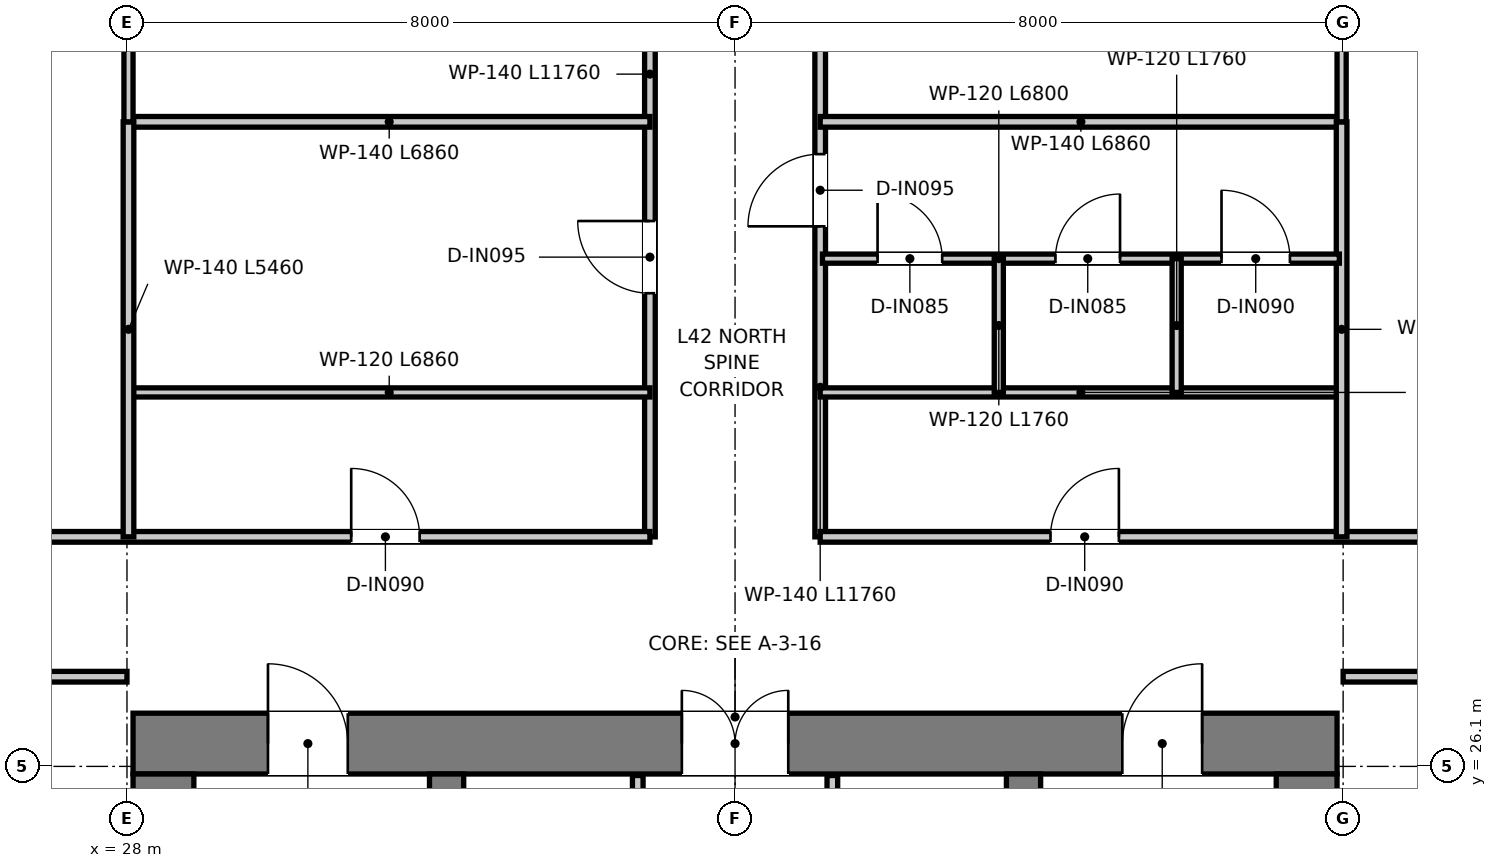
"""IFC4 building model, lengths in metres.
Left out: names, types, materials, properties, quantities, classifications, styles, units other than length and angle.
Written with IfcOpenShell. Run it as: python <this file> out.ifc"""

import sys

from ifc_helpers import new_model, si_unit, direction, frame, frame_2d, origin, place, context, subcontext, project, spatial, rectangle, extrude, element, fill, save


model = new_model("IFC4")
c1 = context("Model", 3, precision=1e-05, world=origin(), true_north=direction((0.0, 1.0)))
c2 = subcontext(c1, "Body", "Model", "MODEL_VIEW")
j1 = project(units=[si_unit("LENGTHUNIT", "METRE"), si_unit("PLANEANGLEUNIT", "RADIAN")], contexts=[c1])
p1 = place(None, origin())
s1 = spatial("IfcSite", under=j1, at=p1, CompositionType="ELEMENT")
p2 = place(p1, origin())
s2 = spatial("IfcBuilding", under=s1, at=p2, CompositionType="ELEMENT")
p3 = place(p2, frame((0.0, 0.0, 173.85)))
s3 = spatial("IfcBuildingStorey", under=s2, at=p3, CompositionType="ELEMENT", Elevation=173.85)
p4 = place(p3, frame((28.08, 26.4, 0.0), z_axis=(0.0, 0.0, 1.0), x_axis=(1.0, 0.0, 0.0)))
e1 = element("IfcWall", 1, at=p4, inside=s3, PredefinedType="SHEAR", context=c2, shape_type="SweptSolid", body=[
    extrude(rectangle(XDim=15.84, YDim=0.8, at=frame_2d((7.92, 0.0))), origin(), (0.0, 0.0, 1.0), 3.95),
])
p5 = place(p4, frame((7.22, 0.0, 0.0)))
e2 = element("IfcOpeningElement", 2, at=p5, cuts=e1, PredefinedType="OPENING", context=c2, shape_type="SweptSolid", body=[
    extrude(rectangle(XDim=1.4, YDim=2.2, at=frame_2d((0.7, 1.1))), frame((0.0, 0.41, 0.0), z_axis=(0.0, -1.0, 0.0), x_axis=(1.0, 0.0, 0.0)), (0.0, 0.0, 1.0), 0.82),
])
p6 = place(p4, frame((1.775, 0.0, 0.0)))
e3 = element("IfcOpeningElement", 3, at=p6, cuts=e1, PredefinedType="OPENING", context=c2, shape_type="SweptSolid", body=[
    extrude(rectangle(XDim=1.05, YDim=2.1, at=frame_2d((0.525, 1.05))), frame((0.0, 0.41, 0.0), z_axis=(0.0, -1.0, 0.0), x_axis=(1.0, 0.0, 0.0)), (0.0, 0.0, 1.0), 0.82),
])
p7 = place(p4, frame((13.015, 0.0, 0.0)))
e4 = element("IfcOpeningElement", 4, at=p7, cuts=e1, PredefinedType="OPENING", context=c2, shape_type="SweptSolid", body=[
    extrude(rectangle(XDim=1.05, YDim=2.1, at=frame_2d((0.525, 1.05))), frame((0.0, 0.41, 0.0), z_axis=(0.0, -1.0, 0.0), x_axis=(1.0, 0.0, 0.0)), (0.0, 0.0, 1.0), 0.82),
])
for number, where, z_axis, x_axis in (
    (5, (28.48, 11.3, 0.0), (0.0, 0.0, 1.0), (0.0, 1.0, 0.0)),
    (6, (43.52, 11.3, 0.0), (0.0, 0.0, 1.0), (0.0, 1.0, 0.0)),
):
    element("IfcWall", number, at=place(p3, frame(where, z_axis=z_axis, x_axis=x_axis)), inside=s3, PredefinedType="SHEAR", context=c2, shape_type="SweptSolid", body=[
        extrude(rectangle(XDim=14.7, YDim=0.8, at=frame_2d((7.35, 0.0))), origin(), (0.0, 0.0, 1.0), 3.95),
    ])
p8 = place(p3, frame((32.205, 13.22, 0.0), z_axis=(0.0, 0.0, 1.0), x_axis=(0.0, 1.0, 0.0)))
e7 = element("IfcWall", 7, at=p8, inside=s3, PredefinedType="SHEAR", context=c2, shape_type="SweptSolid", body=[
    extrude(rectangle(XDim=12.78, YDim=0.45, at=frame_2d((6.39, 0.0))), origin(), (0.0, 0.0, 1.0), 3.95),
])
p9 = place(p8, frame((10.58, 0.0, 0.0)))
e8 = element("IfcOpeningElement", 8, at=p9, cuts=e7, PredefinedType="OPENING", context=c2, shape_type="SweptSolid", body=[
    extrude(rectangle(XDim=1.1, YDim=2.15, at=frame_2d((0.55, 1.075))), frame((0.0, 0.235, 0.0), z_axis=(0.0, -1.0, 0.0), x_axis=(1.0, 0.0, 0.0)), (0.0, 0.0, 1.0), 0.47),
])
p10 = place(p3, frame((39.795, 13.22, 0.0), z_axis=(0.0, 0.0, 1.0), x_axis=(0.0, 1.0, 0.0)))
e9 = element("IfcWall", 9, at=p10, inside=s3, PredefinedType="SHEAR", context=c2, shape_type="SweptSolid", body=[
    extrude(rectangle(XDim=12.78, YDim=0.45, at=frame_2d((6.39, 0.0))), origin(), (0.0, 0.0, 1.0), 3.95),
])
p11 = place(p10, frame((10.58, 0.0, 0.0)))
e10 = element("IfcOpeningElement", 10, at=p11, cuts=e9, PredefinedType="OPENING", context=c2, shape_type="SweptSolid", body=[
    extrude(rectangle(XDim=1.1, YDim=2.15, at=frame_2d((0.55, 1.075))), frame((0.0, 0.235, 0.0), z_axis=(0.0, -1.0, 0.0), x_axis=(1.0, 0.0, 0.0)), (0.0, 0.0, 1.0), 0.47),
])
p12 = place(p3, frame((34.72, 20.2, 0.0), z_axis=(0.0, 0.0, 1.0), x_axis=(0.0, 1.0, 0.0)))
e11 = element("IfcWall", 11, at=p12, inside=s3, PredefinedType="PARTITIONING", context=c2, shape_type="SweptSolid", body=[
    extrude(rectangle(XDim=5.78, YDim=0.14, at=frame_2d((2.89, 0.0))), origin(), (0.0, 0.0, 1.0), 2.67),
])
p13 = place(p12, frame((1.05, 0.0, 0.0)))
e12 = element("IfcOpeningElement", 12, at=p13, cuts=e11, PredefinedType="OPENING", context=c2, shape_type="SweptSolid", body=[
    extrude(rectangle(XDim=0.9, YDim=2.1, at=frame_2d((0.45, 1.05))), frame((0.0, 0.08, 0.0), z_axis=(0.0, -1.0, 0.0), x_axis=(1.0, 0.0, 0.0)), (0.0, 0.0, 1.0), 0.16),
])
p14 = place(p3, frame((37.28, 20.2, 0.0), z_axis=(0.0, 0.0, 1.0), x_axis=(0.0, 1.0, 0.0)))
e13 = element("IfcWall", 13, at=p14, inside=s3, PredefinedType="PARTITIONING", context=c2, shape_type="SweptSolid", body=[
    extrude(rectangle(XDim=5.78, YDim=0.14, at=frame_2d((2.89, 0.0))), origin(), (0.0, 0.0, 1.0), 2.67),
])
p15 = place(p14, frame((0.95, 0.0, 0.0)))
e14 = element("IfcOpeningElement", 14, at=p15, cuts=e13, PredefinedType="OPENING", context=c2, shape_type="SweptSolid", body=[
    extrude(rectangle(XDim=1.1, YDim=2.15, at=frame_2d((0.55, 1.075))), frame((0.0, 0.08, 0.0), z_axis=(0.0, -1.0, 0.0), x_axis=(1.0, 0.0, 0.0)), (0.0, 0.0, 1.0), 0.16),
])
p16 = place(p3, frame((34.88, 29.12, 0.0), z_axis=(0.0, 0.0, 1.0), x_axis=(0.0, 1.0, 0.0)))
e15 = element("IfcWall", 15, at=p16, inside=s3, PredefinedType="PARTITIONING", context=c2, shape_type="SweptSolid", body=[
    extrude(rectangle(XDim=11.76, YDim=0.14, at=frame_2d((5.88, 0.0))), origin(), (0.0, 0.0, 1.0), 3.03),
])
p17 = place(p16, frame((3.205, 0.0, 0.0)))
e16 = element("IfcOpeningElement", 16, at=p17, cuts=e15, PredefinedType="OPENING", context=c2, shape_type="SweptSolid", body=[
    extrude(rectangle(XDim=0.95, YDim=2.1, at=frame_2d((0.475, 1.05))), frame((0.0, 0.08, 0.0), z_axis=(0.0, -1.0, 0.0), x_axis=(1.0, 0.0, 0.0)), (0.0, 0.0, 1.0), 0.16),
])
p18 = place(p16, frame((8.02, 0.0, 0.0)))
e17 = element("IfcOpeningElement", 17, at=p18, cuts=e15, PredefinedType="OPENING", context=c2, shape_type="SweptSolid", body=[
    extrude(rectangle(XDim=0.9, YDim=2.1, at=frame_2d((0.45, 1.05))), frame((0.0, 0.08, 0.0), z_axis=(0.0, -1.0, 0.0), x_axis=(1.0, 0.0, 0.0)), (0.0, 0.0, 1.0), 0.16),
])
p19 = place(p3, frame((37.12, 29.12, 0.0), z_axis=(0.0, 0.0, 1.0), x_axis=(0.0, 1.0, 0.0)))
e18 = element("IfcWall", 18, at=p19, inside=s3, PredefinedType="PARTITIONING", context=c2, shape_type="SweptSolid", body=[
    extrude(rectangle(XDim=11.76, YDim=0.14, at=frame_2d((5.88, 0.0))), origin(), (0.0, 0.0, 1.0), 3.03),
])
p20 = place(p19, frame((4.085, 0.0, 0.0)))
e19 = element("IfcOpeningElement", 19, at=p20, cuts=e18, PredefinedType="OPENING", context=c2, shape_type="SweptSolid", body=[
    extrude(rectangle(XDim=0.95, YDim=2.1, at=frame_2d((0.475, 1.05))), frame((0.0, 0.08, 0.0), z_axis=(0.0, -1.0, 0.0), x_axis=(1.0, 0.0, 0.0)), (0.0, 0.0, 1.0), 0.16),
])
p21 = place(p19, frame((6.82, 0.0, 0.0)))
e20 = element("IfcOpeningElement", 20, at=p21, cuts=e18, PredefinedType="OPENING", context=c2, shape_type="SweptSolid", body=[
    extrude(rectangle(XDim=0.9, YDim=2.1, at=frame_2d((0.45, 1.05))), frame((0.0, 0.08, 0.0), z_axis=(0.0, -1.0, 0.0), x_axis=(1.0, 0.0, 0.0)), (0.0, 0.0, 1.0), 0.16),
])
p22 = place(p19, frame((9.83, 0.0, 0.0)))
e21 = element("IfcOpeningElement", 21, at=p22, cuts=e18, PredefinedType="OPENING", context=c2, shape_type="SweptSolid", body=[
    extrude(rectangle(XDim=0.9, YDim=2.1, at=frame_2d((0.45, 1.05))), frame((0.0, 0.08, 0.0), z_axis=(0.0, -1.0, 0.0), x_axis=(1.0, 0.0, 0.0)), (0.0, 0.0, 1.0), 0.16),
])
p23 = place(p3, frame((11.822, 29.12, 0.0), z_axis=(0.0, 0.0, 1.0), x_axis=(1.0, 0.0, 0.0)))
e22 = element("IfcWall", 22, at=p23, inside=s3, PredefinedType="PARTITIONING", context=c2, shape_type="SweptSolid", body=[
    extrude(rectangle(XDim=23.058, YDim=0.14, at=frame_2d((11.529, 0.0))), origin(), (0.0, 0.0, 1.0), 3.03),
])
p24 = place(p23, frame((19.128, 0.0, 0.0)))
e23 = element("IfcOpeningElement", 23, at=p24, cuts=e22, PredefinedType="OPENING", context=c2, shape_type="SweptSolid", body=[
    extrude(rectangle(XDim=0.9, YDim=2.1, at=frame_2d((0.45, 1.05))), frame((0.0, 0.08, 0.0), z_axis=(0.0, -1.0, 0.0), x_axis=(1.0, 0.0, 0.0)), (0.0, 0.0, 1.0), 0.16),
])
p25 = place(p23, frame((2.137, 0.0, 0.0)))
e24 = element("IfcOpeningElement", 24, at=p25, cuts=e22, PredefinedType="OPENING", context=c2, shape_type="SweptSolid", body=[
    extrude(rectangle(XDim=0.9, YDim=2.1, at=frame_2d((0.45, 1.05))), frame((0.0, 0.08, 0.0), z_axis=(0.0, -1.0, 0.0), x_axis=(1.0, 0.0, 0.0)), (0.0, 0.0, 1.0), 0.16),
])
p26 = place(p23, frame((8.728, 0.0, 0.0)))
e25 = element("IfcOpeningElement", 25, at=p26, cuts=e22, PredefinedType="OPENING", context=c2, shape_type="SweptSolid", body=[
    extrude(rectangle(XDim=0.9, YDim=2.1, at=frame_2d((0.45, 1.05))), frame((0.0, 0.08, 0.0), z_axis=(0.0, -1.0, 0.0), x_axis=(1.0, 0.0, 0.0)), (0.0, 0.0, 1.0), 0.16),
])
p27 = place(p23, frame((11.578, 0.0, 0.0)))
e26 = element("IfcOpeningElement", 26, at=p27, cuts=e22, PredefinedType="OPENING", context=c2, shape_type="SweptSolid", body=[
    extrude(rectangle(XDim=0.9, YDim=2.1, at=frame_2d((0.45, 1.05))), frame((0.0, 0.08, 0.0), z_axis=(0.0, -1.0, 0.0), x_axis=(1.0, 0.0, 0.0)), (0.0, 0.0, 1.0), 0.16),
])
p28 = place(p23, frame((14.128, 0.0, 0.0)))
e27 = element("IfcOpeningElement", 27, at=p28, cuts=e22, PredefinedType="OPENING", context=c2, shape_type="SweptSolid", body=[
    extrude(rectangle(XDim=0.9, YDim=2.1, at=frame_2d((0.45, 1.05))), frame((0.0, 0.08, 0.0), z_axis=(0.0, -1.0, 0.0), x_axis=(1.0, 0.0, 0.0)), (0.0, 0.0, 1.0), 0.16),
])
p29 = place(p3, frame((37.12, 29.12, 0.0), z_axis=(0.0, 0.0, 1.0), x_axis=(1.0, 0.0, 0.0)))
e28 = element("IfcWall", 28, at=p29, inside=s3, PredefinedType="PARTITIONING", context=c2, shape_type="SweptSolid", body=[
    extrude(rectangle(XDim=26.068, YDim=0.14, at=frame_2d((13.034, 0.0))), origin(), (0.0, 0.0, 1.0), 3.03),
])
p30 = place(p29, frame((3.03, 0.0, 0.0)))
e29 = element("IfcOpeningElement", 29, at=p30, cuts=e28, PredefinedType="OPENING", context=c2, shape_type="SweptSolid", body=[
    extrude(rectangle(XDim=0.9, YDim=2.1, at=frame_2d((0.45, 1.05))), frame((0.0, 0.08, 0.0), z_axis=(0.0, -1.0, 0.0), x_axis=(1.0, 0.0, 0.0)), (0.0, 0.0, 1.0), 0.16),
])
p31 = place(p29, frame((15.761, 0.0, 0.0)))
e30 = element("IfcOpeningElement", 30, at=p31, cuts=e28, PredefinedType="OPENING", context=c2, shape_type="SweptSolid", body=[
    extrude(rectangle(XDim=0.9, YDim=2.1, at=frame_2d((0.45, 1.05))), frame((0.0, 0.08, 0.0), z_axis=(0.0, -1.0, 0.0), x_axis=(1.0, 0.0, 0.0)), (0.0, 0.0, 1.0), 0.16),
])
p32 = place(p3, frame((10.678, 27.28, 0.0), z_axis=(0.0, 0.0, 1.0), x_axis=(1.0, 0.0, 0.0)))
e31 = element("IfcWall", 31, at=p32, inside=s3, PredefinedType="PARTITIONING", context=c2, shape_type="SweptSolid", body=[
    extrude(rectangle(XDim=17.322, YDim=0.14, at=frame_2d((8.661, 0.0))), origin(), (0.0, 0.0, 1.0), 3.03),
])
p33 = place(p32, frame((7.231, 0.0, 0.0)))
e32 = element("IfcOpeningElement", 32, at=p33, cuts=e31, PredefinedType="OPENING", context=c2, shape_type="SweptSolid", body=[
    extrude(rectangle(XDim=0.9, YDim=2.1, at=frame_2d((0.45, 1.05))), frame((0.0, 0.08, 0.0), z_axis=(0.0, -1.0, 0.0), x_axis=(1.0, 0.0, 0.0)), (0.0, 0.0, 1.0), 0.16),
])
p34 = place(p3, frame((44.0, 27.28, 0.0), z_axis=(0.0, 0.0, 1.0), x_axis=(1.0, 0.0, 0.0)))
e33 = element("IfcWall", 33, at=p34, inside=s3, PredefinedType="PARTITIONING", context=c2, shape_type="SweptSolid", body=[
    extrude(rectangle(XDim=18.044, YDim=0.14, at=frame_2d((9.022, 0.0))), origin(), (0.0, 0.0, 1.0), 3.03),
])
p35 = place(p34, frame((1.6, 0.0, 0.0)))
e34 = element("IfcOpeningElement", 34, at=p35, cuts=e33, PredefinedType="OPENING", context=c2, shape_type="SweptSolid", body=[
    extrude(rectangle(XDim=0.9, YDim=2.1, at=frame_2d((0.45, 1.05))), frame((0.0, 0.08, 0.0), z_axis=(0.0, -1.0, 0.0), x_axis=(1.0, 0.0, 0.0)), (0.0, 0.0, 1.0), 0.16),
])
p36 = place(p34, frame((4.75, 0.0, 0.0)))
e35 = element("IfcOpeningElement", 35, at=p36, cuts=e33, PredefinedType="OPENING", context=c2, shape_type="SweptSolid", body=[
    extrude(rectangle(XDim=0.9, YDim=2.1, at=frame_2d((0.45, 1.05))), frame((0.0, 0.08, 0.0), z_axis=(0.0, -1.0, 0.0), x_axis=(1.0, 0.0, 0.0)), (0.0, 0.0, 1.0), 0.16),
])
p37 = place(p34, frame((13.191, 0.0, 0.0)))
e36 = element("IfcOpeningElement", 36, at=p37, cuts=e33, PredefinedType="OPENING", context=c2, shape_type="SweptSolid", body=[
    extrude(rectangle(XDim=0.9, YDim=2.1, at=frame_2d((0.45, 1.05))), frame((0.0, 0.08, 0.0), z_axis=(0.0, -1.0, 0.0), x_axis=(1.0, 0.0, 0.0)), (0.0, 0.0, 1.0), 0.16),
])
for number, where, z_axis, x_axis in (
    (37, (28.02, 31.02, 0.0), (0.0, 0.0, 1.0), (1.0, 0.0, 0.0)),
    (38, (37.12, 31.02, 0.0), (0.0, 0.0, 1.0), (1.0, 0.0, 0.0)),
):
    element("IfcWall", number, at=place(p3, frame(where, z_axis=z_axis, x_axis=x_axis)), inside=s3, PredefinedType="PARTITIONING", context=c2, shape_type="SweptSolid", body=[
        extrude(rectangle(XDim=6.86, YDim=0.12, at=frame_2d((3.43, 0.0))), origin(), (0.0, 0.0, 1.0), 3.08),
    ])
for number, where, z_axis, x_axis in (
    (39, (28.02, 34.58, 0.0), (0.0, 0.0, 1.0), (1.0, 0.0, 0.0)),
    (40, (37.12, 34.58, 0.0), (0.0, 0.0, 1.0), (1.0, 0.0, 0.0)),
):
    element("IfcWall", number, at=place(p3, frame(where, z_axis=z_axis, x_axis=x_axis)), inside=s3, PredefinedType="PARTITIONING", context=c2, shape_type="SweptSolid", body=[
        extrude(rectangle(XDim=6.86, YDim=0.14, at=frame_2d((3.43, 0.0))), origin(), (0.0, 0.0, 1.0), 3.08),
    ])
for number, where, z_axis, x_axis in (
    (41, (28.02, 29.12, 0.0), (0.0, 0.0, 1.0), (0.0, 1.0, 0.0)),
    (42, (43.98, 29.12, 0.0), (0.0, 0.0, 1.0), (0.0, 1.0, 0.0)),
):
    element("IfcWall", number, at=place(p3, frame(where, z_axis=z_axis, x_axis=x_axis)), inside=s3, PredefinedType="PARTITIONING", context=c2, shape_type="SweptSolid", body=[
        extrude(rectangle(XDim=5.46, YDim=0.14, at=frame_2d((2.73, 0.0))), origin(), (0.0, 0.0, 1.0), 3.31),
    ])
p38 = place(p3, frame((37.15, 32.78, 0.0), z_axis=(0.0, 0.0, 1.0), x_axis=(1.0, 0.0, 0.0)))
e43 = element("IfcWall", 43, at=p38, inside=s3, PredefinedType="PARTITIONING", context=c2, shape_type="SweptSolid", body=[
    extrude(rectangle(XDim=6.8, YDim=0.12, at=frame_2d((3.4, 0.0))), origin(), (0.0, 0.0, 1.0), 3.08),
])
p39 = place(p38, frame((0.725, 0.0, 0.0)))
e44 = element("IfcOpeningElement", 44, at=p39, cuts=e43, PredefinedType="OPENING", context=c2, shape_type="SweptSolid", body=[
    extrude(rectangle(XDim=0.85, YDim=2.1, at=frame_2d((0.425, 1.05))), frame((0.0, 0.07, 0.0), z_axis=(0.0, -1.0, 0.0), x_axis=(1.0, 0.0, 0.0)), (0.0, 0.0, 1.0), 0.14),
])
p40 = place(p38, frame((3.065, 0.0, 0.0)))
e45 = element("IfcOpeningElement", 45, at=p40, cuts=e43, PredefinedType="OPENING", context=c2, shape_type="SweptSolid", body=[
    extrude(rectangle(XDim=0.85, YDim=2.1, at=frame_2d((0.425, 1.05))), frame((0.0, 0.07, 0.0), z_axis=(0.0, -1.0, 0.0), x_axis=(1.0, 0.0, 0.0)), (0.0, 0.0, 1.0), 0.14),
])
p41 = place(p38, frame((5.25, 0.0, 0.0)))
e46 = element("IfcOpeningElement", 46, at=p41, cuts=e43, PredefinedType="OPENING", context=c2, shape_type="SweptSolid", body=[
    extrude(rectangle(XDim=0.9, YDim=2.1, at=frame_2d((0.45, 1.05))), frame((0.0, 0.07, 0.0), z_axis=(0.0, -1.0, 0.0), x_axis=(1.0, 0.0, 0.0)), (0.0, 0.0, 1.0), 0.14),
])
for number, where, z_axis, x_axis in (
    (47, (39.47, 31.02, 0.0), (0.0, 0.0, 1.0), (0.0, 1.0, 0.0)),
    (48, (41.81, 31.02, 0.0), (0.0, 0.0, 1.0), (0.0, 1.0, 0.0)),
):
    element("IfcWall", number, at=place(p3, frame(where, z_axis=z_axis, x_axis=x_axis)), inside=s3, PredefinedType="PARTITIONING", context=c2, shape_type="SweptSolid", body=[
        extrude(rectangle(XDim=1.76, YDim=0.12, at=frame_2d((0.88, 0.0))), origin(), (0.0, 0.0, 1.0), 3.67),
    ])
p42 = place(p3, frame((28.02, 34.58, 0.0), z_axis=(0.0, 0.0, 1.0), x_axis=(0.0, 1.0, 0.0)))
e49 = element("IfcWall", 49, at=p42, inside=s3, PredefinedType="PARTITIONING", context=c2, shape_type="SweptSolid", body=[
    extrude(rectangle(XDim=17.307, YDim=0.12, at=frame_2d((8.654, 0.0))), origin(), (0.0, 0.0, 1.0), 3.03),
])
p43 = place(p3, frame((43.98, 34.58, 0.0), z_axis=(0.0, 0.0, 1.0), x_axis=(0.0, 1.0, 0.0)))
e50 = element("IfcWall", 50, at=p43, inside=s3, PredefinedType="PARTITIONING", context=c2, shape_type="SweptSolid", body=[
    extrude(rectangle(XDim=12.841, YDim=0.12, at=frame_2d((6.42, 0.0))), origin(), (0.0, 0.0, 1.0), 3.03),
])
p44 = place(p5, origin())
e51 = element("IfcDoor", 51, at=p44, inside=s3, OperationType="DOUBLE_DOOR_SINGLE_SWING", PredefinedType="DOOR", context=c2, shape_type="SweptSolid", body=[
    extrude(rectangle(XDim=1.4, YDim=2.2, at=frame_2d((0.7, 1.1))), frame((0.0, 0.025, 0.0), z_axis=(0.0, -1.0, 0.0), x_axis=(1.0, 0.0, 0.0)), (0.0, 0.0, 1.0), 0.05),
])
fill(e2, e51)
p45 = place(p6, origin())
e52 = element("IfcDoor", 52, at=p45, inside=s3, OperationType="SINGLE_SWING_LEFT", PredefinedType="DOOR", context=c2, shape_type="SweptSolid", body=[
    extrude(rectangle(XDim=1.05, YDim=2.1, at=frame_2d((0.525, 1.05))), frame((0.0, 0.025, 0.0), z_axis=(0.0, -1.0, 0.0), x_axis=(1.0, 0.0, 0.0)), (0.0, 0.0, 1.0), 0.05),
])
fill(e3, e52)
p46 = place(p7, origin())
e53 = element("IfcDoor", 53, at=p46, inside=s3, OperationType="SINGLE_SWING_RIGHT", PredefinedType="DOOR", context=c2, shape_type="SweptSolid", body=[
    extrude(rectangle(XDim=1.05, YDim=2.1, at=frame_2d((0.525, 1.05))), frame((0.0, 0.025, 0.0), z_axis=(0.0, -1.0, 0.0), x_axis=(1.0, 0.0, 0.0)), (0.0, 0.0, 1.0), 0.05),
])
fill(e4, e53)
p47 = place(p24, origin())
e54 = element("IfcDoor", 54, at=p47, inside=s3, OperationType="SINGLE_SWING_LEFT", PredefinedType="DOOR", context=c2, shape_type="SweptSolid", body=[
    extrude(rectangle(XDim=0.9, YDim=2.1, at=frame_2d((0.45, 1.05))), frame((0.0, 0.025, 0.0), z_axis=(0.0, -1.0, 0.0), x_axis=(1.0, 0.0, 0.0)), (0.0, 0.0, 1.0), 0.05),
])
fill(e23, e54)
p48 = place(p30, origin())
e55 = element("IfcDoor", 55, at=p48, inside=s3, OperationType="SINGLE_SWING_RIGHT", PredefinedType="DOOR", context=c2, shape_type="SweptSolid", body=[
    extrude(rectangle(XDim=0.9, YDim=2.1, at=frame_2d((0.45, 1.05))), frame((0.0, 0.025, 0.0), z_axis=(0.0, -1.0, 0.0), x_axis=(1.0, 0.0, 0.0)), (0.0, 0.0, 1.0), 0.05),
])
fill(e29, e55)
p49 = place(p20, origin())
e56 = element("IfcDoor", 56, at=p49, inside=s3, OperationType="SINGLE_SWING_LEFT", PredefinedType="DOOR", context=c2, shape_type="SweptSolid", body=[
    extrude(rectangle(XDim=0.95, YDim=2.1, at=frame_2d((0.475, 1.05))), frame((0.0, 0.025, 0.0), z_axis=(0.0, -1.0, 0.0), x_axis=(1.0, 0.0, 0.0)), (0.0, 0.0, 1.0), 0.05),
])
fill(e19, e56)
p50 = place(p17, origin())
e57 = element("IfcDoor", 57, at=p50, inside=s3, OperationType="SINGLE_SWING_RIGHT", PredefinedType="DOOR", context=c2, shape_type="SweptSolid", body=[
    extrude(rectangle(XDim=0.95, YDim=2.1, at=frame_2d((0.475, 1.05))), frame((0.0, 0.025, 0.0), z_axis=(0.0, -1.0, 0.0), x_axis=(1.0, 0.0, 0.0)), (0.0, 0.0, 1.0), 0.05),
])
fill(e16, e57)
p51 = place(p39, origin())
e58 = element("IfcDoor", 58, at=p51, inside=s3, OperationType="SINGLE_SWING_LEFT", PredefinedType="DOOR", context=c2, shape_type="SweptSolid", body=[
    extrude(rectangle(XDim=0.85, YDim=2.1, at=frame_2d((0.425, 1.05))), frame((0.0, 0.025, 0.0), z_axis=(0.0, -1.0, 0.0), x_axis=(1.0, 0.0, 0.0)), (0.0, 0.0, 1.0), 0.05),
])
fill(e44, e58)
p52 = place(p40, origin())
e59 = element("IfcDoor", 59, at=p52, inside=s3, OperationType="SINGLE_SWING_RIGHT", PredefinedType="DOOR", context=c2, shape_type="SweptSolid", body=[
    extrude(rectangle(XDim=0.85, YDim=2.1, at=frame_2d((0.425, 1.05))), frame((0.0, 0.025, 0.0), z_axis=(0.0, -1.0, 0.0), x_axis=(1.0, 0.0, 0.0)), (0.0, 0.0, 1.0), 0.05),
])
fill(e45, e59)
p53 = place(p41, origin())
e60 = element("IfcDoor", 60, at=p53, inside=s3, OperationType="SINGLE_SWING_LEFT", PredefinedType="DOOR", context=c2, shape_type="SweptSolid", body=[
    extrude(rectangle(XDim=0.9, YDim=2.1, at=frame_2d((0.45, 1.05))), frame((0.0, 0.025, 0.0), z_axis=(0.0, -1.0, 0.0), x_axis=(1.0, 0.0, 0.0)), (0.0, 0.0, 1.0), 0.05),
])
fill(e46, e60)
save(model, sys.argv[1])
